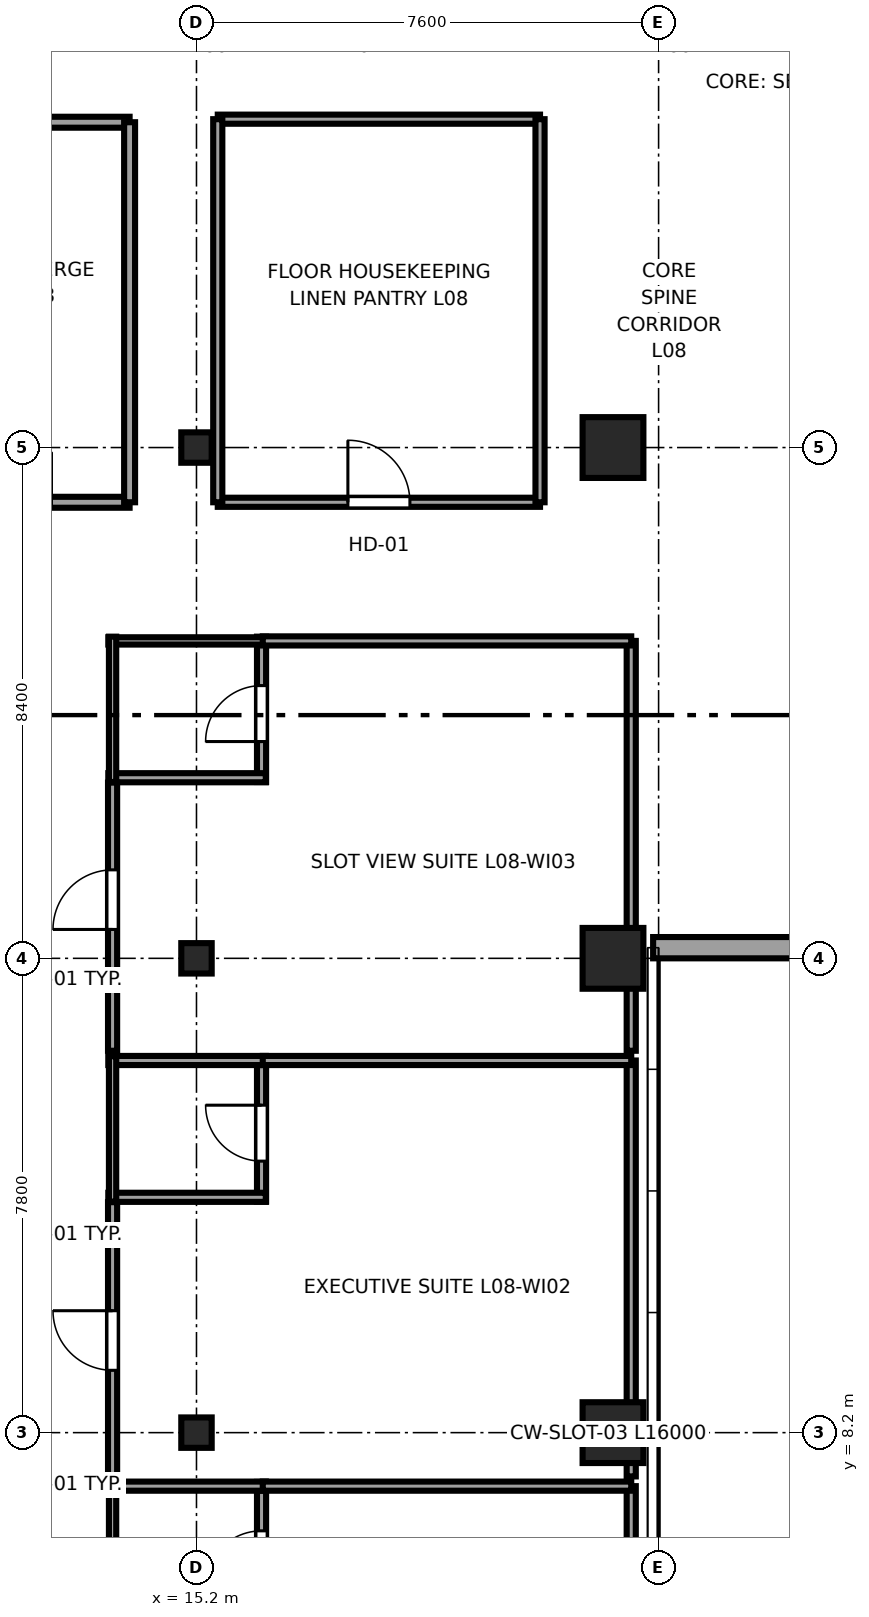
"""IFC4 building model, lengths in metres.
Left out: names, types, materials, properties, quantities, classifications, styles, units other than length and angle.
Written with IfcOpenShell. Run it as: python <this file> out.ifc"""

import sys

from ifc_helpers import new_model, si_unit, direction, frame, frame_2d, origin, origin_2d, place, context, subcontext, project, spatial, rectangle, i_section, extrude, source, transform, mapped, element, fill, save


model = new_model("IFC4")
c1 = context("Model", 3, precision=1e-05, world=origin(), true_north=direction((0.0, 1.0)))
c2 = subcontext(c1, "Body", "Model", "MODEL_VIEW")
j1 = project(units=[si_unit("LENGTHUNIT", "METRE"), si_unit("PLANEANGLEUNIT", "RADIAN")], contexts=[c1])
p1 = place(None, origin())
s1 = spatial("IfcSite", under=j1, at=p1, CompositionType="ELEMENT")
p2 = place(p1, origin())
s2 = spatial("IfcBuilding", under=s1, at=p2, CompositionType="ELEMENT")
p3 = place(p2, frame((0.0, 0.0, 39.1)))
s3 = spatial("IfcBuildingStorey", under=s2, at=p3, CompositionType="ELEMENT", Elevation=39.1)
m1 = source(origin(), c2, "Body", "SweptSolid", [
    extrude(i_section(OverallWidth=0.5, OverallDepth=0.5, WebThickness=0.028, FlangeThickness=0.045, at=origin_2d()), origin(), (0.0, 0.0, 1.0), 3.55),
])
for number, where, z_axis, x_axis in (
    (1, (15.2, 8.2, 0.0), (0.0, 0.0, 1.0), (1.0, 0.0, 0.0)),
    (2, (15.2, 16.0, 0.0), (0.0, 0.0, 1.0), (1.0, 0.0, 0.0)),
    (3, (15.2, 24.4, 0.0), (0.0, 0.0, 1.0), (1.0, 0.0, 0.0)),
):
    element("IfcColumn", number, at=place(p3, frame(where, z_axis=z_axis, x_axis=x_axis)), inside=s3, PredefinedType="COLUMN", context=c2, shape_type="MappedRepresentation", body=[
        mapped(m1, transform((0.0, 0.0, 0.0), x_axis=(1.0, 0.0, 0.0), y_axis=(0.0, 1.0, 0.0), z_axis=(0.0, 0.0, 1.0), scale=1.0)),
    ])
m2 = source(origin(), c2, "Body", "SweptSolid", [
    extrude(rectangle(XDim=1.0, YDim=1.0, at=origin_2d()), origin(), (0.0, 0.0, 1.0), 3.55),
])
for number, where, z_axis, x_axis in (
    (4, (22.05, 8.2, 0.0), (0.0, 0.0, 1.0), (1.0, 0.0, 0.0)),
    (5, (22.05, 16.0, 0.0), (0.0, 0.0, 1.0), (1.0, 0.0, 0.0)),
    (6, (22.05, 24.4, 0.0), (0.0, 0.0, 1.0), (1.0, 0.0, 0.0)),
):
    element("IfcColumn", number, at=place(p3, frame(where, z_axis=z_axis, x_axis=x_axis)), inside=s3, PredefinedType="COLUMN", context=c2, shape_type="MappedRepresentation", body=[
        mapped(m2, transform((0.0, 0.0, 0.0), x_axis=(1.0, 0.0, 0.0), y_axis=(0.0, 1.0, 0.0), z_axis=(0.0, 0.0, 1.0), scale=1.0)),
    ])
p4 = place(p3, frame((22.71, 16.175, 0.0), z_axis=(0.0, 0.0, 1.0), x_axis=(1.0, 0.0, 0.0)))
e7 = element("IfcWall", 7, at=p4, inside=s3, PredefinedType="SOLIDWALL", context=c2, shape_type="SweptSolid", body=[
    extrude(rectangle(XDim=11.58, YDim=0.35, at=frame_2d((5.79, 0.0))), origin(), (0.0, 0.0, 1.0), 2.748),
])
p5 = place(p4, frame((2.295, 0.0, 0.68)))
e8 = element("IfcOpeningElement", 8, at=p5, cuts=e7, PredefinedType="OPENING", context=c2, shape_type="SweptSolid", body=[
    extrude(rectangle(XDim=1.8, YDim=1.85, at=frame_2d((0.9, 0.925))), frame((0.0, 0.185, 0.0), z_axis=(0.0, -1.0, 0.0), x_axis=(1.0, 0.0, 0.0)), (0.0, 0.0, 1.0), 0.37),
])
p6 = place(p4, frame((7.485, 0.0, 0.68)))
e9 = element("IfcOpeningElement", 9, at=p6, cuts=e7, PredefinedType="OPENING", context=c2, shape_type="SweptSolid", body=[
    extrude(rectangle(XDim=1.8, YDim=1.85, at=frame_2d((0.9, 0.925))), frame((0.0, 0.185, 0.0), z_axis=(0.0, -1.0, 0.0), x_axis=(1.0, 0.0, 0.0)), (0.0, 0.0, 1.0), 0.37),
])
p7 = place(p3, frame((16.27, 5.0, 0.0), z_axis=(0.0, 0.0, 1.0), x_axis=(0.0, 1.0, 0.0)))
e10 = element("IfcWall", 10, at=p7, inside=s3, PredefinedType="PARTITIONING", context=c2, shape_type="SweptSolid", body=[
    extrude(rectangle(XDim=2.39, YDim=0.15, at=frame_2d((1.195, 0.0))), origin(), (0.0, 0.0, 1.0), 3.37),
])
p8 = place(p7, frame((0.665, 0.0, 0.0)))
e11 = element("IfcOpeningElement", 11, at=p8, cuts=e10, PredefinedType="OPENING", context=c2, shape_type="SweptSolid", body=[
    extrude(rectangle(XDim=0.92, YDim=2.01, at=frame_2d((0.46, 1.005))), frame((0.0, 0.085, 0.0), z_axis=(0.0, -1.0, 0.0), x_axis=(1.0, 0.0, 0.0)), (0.0, 0.0, 1.0), 0.17),
])
p9 = place(p3, frame((13.75, 7.32, 0.0), z_axis=(0.0, 0.0, 1.0), x_axis=(1.0, 0.0, 0.0)))
e12 = element("IfcWall", 12, at=p9, inside=s3, PredefinedType="PARTITIONING", context=c2, shape_type="SweptSolid", body=[
    extrude(rectangle(XDim=2.59, YDim=0.15, at=frame_2d((1.295, 0.0))), origin(), (0.0, 0.0, 1.0), 3.37),
])
p10 = place(p3, frame((13.82, 5.0, 0.0), z_axis=(0.0, 0.0, 1.0), x_axis=(0.0, 1.0, 0.0)))
e13 = element("IfcWall", 13, at=p10, inside=s3, PredefinedType="PLUMBINGWALL", context=c2, shape_type="SweptSolid", body=[
    extrude(rectangle(XDim=2.39, YDim=0.12, at=frame_2d((1.195, 0.0))), origin(), (0.0, 0.0, 1.0), 3.37),
])
p11 = place(p3, frame((16.27, 12.0, 0.0), z_axis=(0.0, 0.0, 1.0), x_axis=(0.0, 1.0, 0.0)))
e14 = element("IfcWall", 14, at=p11, inside=s3, PredefinedType="PARTITIONING", context=c2, shape_type="SweptSolid", body=[
    extrude(rectangle(XDim=2.39, YDim=0.15, at=frame_2d((1.195, 0.0))), origin(), (0.0, 0.0, 1.0), 3.37),
])
p12 = place(p11, frame((0.665, 0.0, 0.0)))
e15 = element("IfcOpeningElement", 15, at=p12, cuts=e14, PredefinedType="OPENING", context=c2, shape_type="SweptSolid", body=[
    extrude(rectangle(XDim=0.92, YDim=2.01, at=frame_2d((0.46, 1.005))), frame((0.0, 0.085, 0.0), z_axis=(0.0, -1.0, 0.0), x_axis=(1.0, 0.0, 0.0)), (0.0, 0.0, 1.0), 0.17),
])
for number, where, z_axis, x_axis in (
    (16, (13.75, 12.07, 0.0), (0.0, 0.0, 1.0), (1.0, 0.0, 0.0)),
    (17, (13.75, 14.32, 0.0), (0.0, 0.0, 1.0), (1.0, 0.0, 0.0)),
):
    element("IfcWall", number, at=place(p3, frame(where, z_axis=z_axis, x_axis=x_axis)), inside=s3, PredefinedType="PARTITIONING", context=c2, shape_type="SweptSolid", body=[
        extrude(rectangle(XDim=2.59, YDim=0.15, at=frame_2d((1.295, 0.0))), origin(), (0.0, 0.0, 1.0), 3.37),
    ])
p13 = place(p3, frame((13.82, 12.0, 0.0), z_axis=(0.0, 0.0, 1.0), x_axis=(0.0, 1.0, 0.0)))
e18 = element("IfcWall", 18, at=p13, inside=s3, PredefinedType="PLUMBINGWALL", context=c2, shape_type="SweptSolid", body=[
    extrude(rectangle(XDim=2.39, YDim=0.12, at=frame_2d((1.195, 0.0))), origin(), (0.0, 0.0, 1.0), 3.37),
])
p14 = place(p3, frame((16.27, 18.9, 0.0), z_axis=(0.0, 0.0, 1.0), x_axis=(0.0, 1.0, 0.0)))
e19 = element("IfcWall", 19, at=p14, inside=s3, PredefinedType="PARTITIONING", context=c2, shape_type="SweptSolid", body=[
    extrude(rectangle(XDim=2.39, YDim=0.15, at=frame_2d((1.195, 0.0))), origin(), (0.0, 0.0, 1.0), 3.37),
])
p15 = place(p14, frame((0.665, 0.0, 0.0)))
e20 = element("IfcOpeningElement", 20, at=p15, cuts=e19, PredefinedType="OPENING", context=c2, shape_type="SweptSolid", body=[
    extrude(rectangle(XDim=0.92, YDim=2.01, at=frame_2d((0.46, 1.005))), frame((0.0, 0.085, 0.0), z_axis=(0.0, -1.0, 0.0), x_axis=(1.0, 0.0, 0.0)), (0.0, 0.0, 1.0), 0.17),
])
p16 = place(p3, frame((13.75, 18.97, 0.0), z_axis=(0.0, 0.0, 1.0), x_axis=(1.0, 0.0, 0.0)))
e21 = element("IfcWall", 21, at=p16, inside=s3, PredefinedType="PARTITIONING", context=c2, shape_type="SweptSolid", body=[
    extrude(rectangle(XDim=2.59, YDim=0.15, at=frame_2d((1.295, 0.0))), origin(), (0.0, 0.0, 1.0), 3.37),
])
p17 = place(p3, frame((13.75, 21.22, 0.0), z_axis=(0.0, 0.0, 1.0), x_axis=(1.0, 0.0, 0.0)))
e22 = element("IfcWall", 22, at=p17, inside=s3, PredefinedType="PLUMBINGWALL", context=c2, shape_type="SweptSolid", body=[
    extrude(rectangle(XDim=2.59, YDim=0.12, at=frame_2d((1.295, 0.0))), origin(), (0.0, 0.0, 1.0), 3.37),
])
p18 = place(p3, frame((13.82, 18.9, 0.0), z_axis=(0.0, 0.0, 1.0), x_axis=(0.0, 1.0, 0.0)))
e23 = element("IfcWall", 23, at=p18, inside=s3, PredefinedType="PLUMBINGWALL", context=c2, shape_type="SweptSolid", body=[
    extrude(rectangle(XDim=2.39, YDim=0.12, at=frame_2d((1.195, 0.0))), origin(), (0.0, 0.0, 1.0), 3.37),
])
p19 = place(p3, frame((22.35, 0.405, 0.0), z_axis=(0.0, 0.0, 1.0), x_axis=(0.0, 1.0, 0.0)))
e24 = element("IfcWall", 24, at=p19, inside=s3, PredefinedType="PARTITIONING", context=c2, shape_type="SweptSolid", body=[
    extrude(rectangle(XDim=6.915, YDim=0.15, at=frame_2d((3.458, 0.0))), origin(), (0.0, 0.0, 1.0), 3.37),
])
p20 = place(p3, frame((16.29, 7.32, 0.0), z_axis=(0.0, 0.0, 1.0), x_axis=(1.0, 0.0, 0.0)))
e25 = element("IfcWall", 25, at=p20, inside=s3, PredefinedType="PARTITIONING", context=c2, shape_type="SweptSolid", body=[
    extrude(rectangle(XDim=6.06, YDim=0.15, at=frame_2d((3.03, 0.0))), origin(), (0.0, 0.0, 1.0), 3.37),
])
p21 = place(p3, frame((13.82, 7.48, 0.0), z_axis=(0.0, 0.0, 1.0), x_axis=(0.0, 1.0, 0.0)))
e26 = element("IfcWall", 26, at=p21, inside=s3, PredefinedType="PARTITIONING", context=c2, shape_type="SweptSolid", body=[
    extrude(rectangle(XDim=4.51, YDim=0.15, at=frame_2d((2.255, 0.0))), origin(), (0.0, 0.0, 1.0), 3.37),
])
p22 = place(p21, frame((1.745, 0.0, 0.0)))
e27 = element("IfcOpeningElement", 27, at=p22, cuts=e26, PredefinedType="OPENING", context=c2, shape_type="SweptSolid", body=[
    extrude(rectangle(XDim=0.98, YDim=2.12, at=frame_2d((0.49, 1.06))), frame((0.0, 0.085, 0.0), z_axis=(0.0, -1.0, 0.0), x_axis=(1.0, 0.0, 0.0)), (0.0, 0.0, 1.0), 0.17),
])
p23 = place(p3, frame((22.35, 7.48, 0.0), z_axis=(0.0, 0.0, 1.0), x_axis=(0.0, 1.0, 0.0)))
e28 = element("IfcWall", 28, at=p23, inside=s3, PredefinedType="PARTITIONING", context=c2, shape_type="SweptSolid", body=[
    extrude(rectangle(XDim=6.84, YDim=0.15, at=frame_2d((3.42, 0.0))), origin(), (0.0, 0.0, 1.0), 3.37),
])
p24 = place(p3, frame((16.29, 14.32, 0.0), z_axis=(0.0, 0.0, 1.0), x_axis=(1.0, 0.0, 0.0)))
e29 = element("IfcWall", 29, at=p24, inside=s3, PredefinedType="PARTITIONING", context=c2, shape_type="SweptSolid", body=[
    extrude(rectangle(XDim=6.06, YDim=0.15, at=frame_2d((3.03, 0.0))), origin(), (0.0, 0.0, 1.0), 3.37),
])
p25 = place(p3, frame((13.82, 14.48, 0.0), z_axis=(0.0, 0.0, 1.0), x_axis=(0.0, 1.0, 0.0)))
e30 = element("IfcWall", 30, at=p25, inside=s3, PredefinedType="PARTITIONING", context=c2, shape_type="SweptSolid", body=[
    extrude(rectangle(XDim=4.41, YDim=0.15, at=frame_2d((2.205, 0.0))), origin(), (0.0, 0.0, 1.0), 3.37),
])
p26 = place(p25, frame((1.995, 0.0, 0.0)))
e31 = element("IfcOpeningElement", 31, at=p26, cuts=e30, PredefinedType="OPENING", context=c2, shape_type="SweptSolid", body=[
    extrude(rectangle(XDim=0.98, YDim=2.12, at=frame_2d((0.49, 1.06))), frame((0.0, 0.085, 0.0), z_axis=(0.0, -1.0, 0.0), x_axis=(1.0, 0.0, 0.0)), (0.0, 0.0, 1.0), 0.17),
])
p27 = place(p3, frame((22.35, 14.48, 0.0), z_axis=(0.0, 0.0, 1.0), x_axis=(0.0, 1.0, 0.0)))
e32 = element("IfcWall", 32, at=p27, inside=s3, PredefinedType="PARTITIONING", context=c2, shape_type="SweptSolid", body=[
    extrude(rectangle(XDim=6.74, YDim=0.15, at=frame_2d((3.37, 0.0))), origin(), (0.0, 0.0, 1.0), 3.37),
])
p28 = place(p3, frame((16.29, 21.22, 0.0), z_axis=(0.0, 0.0, 1.0), x_axis=(1.0, 0.0, 0.0)))
e33 = element("IfcWall", 33, at=p28, inside=s3, PredefinedType="PARTITIONING", context=c2, shape_type="SweptSolid", body=[
    extrude(rectangle(XDim=6.06, YDim=0.15, at=frame_2d((3.03, 0.0))), origin(), (0.0, 0.0, 1.0), 3.37),
])
p29 = place(p3, frame((9.88, 23.5, 0.0), z_axis=(0.0, 0.0, 1.0), x_axis=(1.0, 0.0, 0.0)))
e34 = element("IfcWall", 34, at=p29, inside=s3, PredefinedType="PARTITIONING", context=c2, shape_type="SweptSolid", body=[
    extrude(rectangle(XDim=4.22, YDim=0.18, at=frame_2d((2.11, 0.0))), origin(), (0.0, 0.0, 1.0), 3.37),
])
p30 = place(p29, frame((1.285, 0.0, 0.0)))
e35 = element("IfcOpeningElement", 35, at=p30, cuts=e34, PredefinedType="OPENING", context=c2, shape_type="SweptSolid", body=[
    extrude(rectangle(XDim=1.65, YDim=2.15, at=frame_2d((0.825, 1.075))), frame((0.0, 0.1, 0.0), z_axis=(0.0, -1.0, 0.0), x_axis=(1.0, 0.0, 0.0)), (0.0, 0.0, 1.0), 0.2),
])
p31 = place(p3, frame((9.88, 29.75, 0.0), z_axis=(0.0, 0.0, 1.0), x_axis=(1.0, 0.0, 0.0)))
e36 = element("IfcWall", 36, at=p31, inside=s3, PredefinedType="PARTITIONING", context=c2, shape_type="SweptSolid", body=[
    extrude(rectangle(XDim=4.22, YDim=0.18, at=frame_2d((2.11, 0.0))), origin(), (0.0, 0.0, 1.0), 3.37),
])
p32 = place(p3, frame((14.1, 23.5, 0.0), z_axis=(0.0, 0.0, 1.0), x_axis=(0.0, 1.0, 0.0)))
e37 = element("IfcWall", 37, at=p32, inside=s3, PredefinedType="PARTITIONING", context=c2, shape_type="SweptSolid", body=[
    extrude(rectangle(XDim=6.25, YDim=0.18, at=frame_2d((3.125, 0.0))), origin(), (0.0, 0.0, 1.0), 3.37),
])
p33 = place(p3, frame((15.55, 23.5, 0.0), z_axis=(0.0, 0.0, 1.0), x_axis=(1.0, 0.0, 0.0)))
e38 = element("IfcWall", 38, at=p33, inside=s3, PredefinedType="PARTITIONING", context=c2, shape_type="SweptSolid", body=[
    extrude(rectangle(XDim=5.3, YDim=0.15, at=frame_2d((2.65, 0.0))), origin(), (0.0, 0.0, 1.0), 3.37),
])
p34 = place(p33, frame((2.14, 0.0, 0.0)))
e39 = element("IfcOpeningElement", 39, at=p34, cuts=e38, PredefinedType="OPENING", context=c2, shape_type="SweptSolid", body=[
    extrude(rectangle(XDim=1.02, YDim=2.03, at=frame_2d((0.51, 1.015))), frame((0.0, 0.085, 0.0), z_axis=(0.0, -1.0, 0.0), x_axis=(1.0, 0.0, 0.0)), (0.0, 0.0, 1.0), 0.17),
])
p35 = place(p3, frame((15.55, 29.8, 0.0), z_axis=(0.0, 0.0, 1.0), x_axis=(1.0, 0.0, 0.0)))
e40 = element("IfcWall", 40, at=p35, inside=s3, PredefinedType="PARTITIONING", context=c2, shape_type="SweptSolid", body=[
    extrude(rectangle(XDim=5.3, YDim=0.15, at=frame_2d((2.65, 0.0))), origin(), (0.0, 0.0, 1.0), 3.37),
])
for number, where, z_axis, x_axis in (
    (41, (15.55, 23.5, 0.0), (0.0, 0.0, 1.0), (0.0, 1.0, 0.0)),
    (42, (20.85, 23.5, 0.0), (0.0, 0.0, 1.0), (0.0, 1.0, 0.0)),
):
    element("IfcWall", number, at=place(p3, frame(where, z_axis=z_axis, x_axis=x_axis)), inside=s3, PredefinedType="PARTITIONING", context=c2, shape_type="SweptSolid", body=[
        extrude(rectangle(XDim=6.3, YDim=0.15, at=frame_2d((3.15, 0.0))), origin(), (0.0, 0.0, 1.0), 3.37),
    ])
m3 = source(origin(), c2, "Body", "SweptSolid", [
    extrude(rectangle(XDim=0.92, YDim=2.01, at=frame_2d((0.46, 1.005))), frame((0.0, 0.025, 0.0), z_axis=(0.0, -1.0, 0.0), x_axis=(1.0, 0.0, 0.0)), (0.0, 0.0, 1.0), 0.05),
])
p36 = place(p8, origin())
e43 = element("IfcDoor", 43, at=p36, inside=s3, OperationType="SINGLE_SWING_LEFT", PredefinedType="DOOR", context=c2, shape_type="MappedRepresentation", body=[
    mapped(m3, transform((0.0, 0.0, 0.0), x_axis=(1.0, 0.0, 0.0), y_axis=(0.0, 1.0, 0.0), z_axis=(0.0, 0.0, 1.0), scale=1.0)),
])
fill(e11, e43)
p37 = place(p12, origin())
e44 = element("IfcDoor", 44, at=p37, inside=s3, OperationType="SINGLE_SWING_RIGHT", PredefinedType="DOOR", context=c2, shape_type="MappedRepresentation", body=[
    mapped(m3, transform((0.0, 0.0, 0.0), x_axis=(1.0, 0.0, 0.0), y_axis=(0.0, 1.0, 0.0), z_axis=(0.0, 0.0, 1.0), scale=1.0)),
])
fill(e15, e44)
p38 = place(p15, origin())
e45 = element("IfcDoor", 45, at=p38, inside=s3, OperationType="SINGLE_SWING_LEFT", PredefinedType="DOOR", context=c2, shape_type="MappedRepresentation", body=[
    mapped(m3, transform((0.0, 0.0, 0.0), x_axis=(1.0, 0.0, 0.0), y_axis=(0.0, 1.0, 0.0), z_axis=(0.0, 0.0, 1.0), scale=1.0)),
])
fill(e20, e45)
m4 = source(origin(), c2, "Body", "SweptSolid", [
    extrude(rectangle(XDim=0.98, YDim=2.12, at=frame_2d((0.49, 1.06))), frame((0.0, 0.025, 0.0), z_axis=(0.0, -1.0, 0.0), x_axis=(1.0, 0.0, 0.0)), (0.0, 0.0, 1.0), 0.05),
])
p39 = place(p22, origin())
e46 = element("IfcDoor", 46, at=p39, inside=s3, OperationType="SINGLE_SWING_RIGHT", PredefinedType="DOOR", context=c2, shape_type="MappedRepresentation", body=[
    mapped(m4, transform((0.0, 0.0, 0.0), x_axis=(1.0, 0.0, 0.0), y_axis=(0.0, 1.0, 0.0), z_axis=(0.0, 0.0, 1.0), scale=1.0)),
])
fill(e27, e46)
p40 = place(p26, origin())
e47 = element("IfcDoor", 47, at=p40, inside=s3, OperationType="SINGLE_SWING_LEFT", PredefinedType="DOOR", context=c2, shape_type="MappedRepresentation", body=[
    mapped(m4, transform((0.0, 0.0, 0.0), x_axis=(1.0, 0.0, 0.0), y_axis=(0.0, 1.0, 0.0), z_axis=(0.0, 0.0, 1.0), scale=1.0)),
])
fill(e31, e47)
m5 = source(origin(), c2, "Body", "SweptSolid", [
    extrude(rectangle(XDim=1.02, YDim=2.03, at=frame_2d((0.51, 1.015))), frame((0.0, 0.025, 0.0), z_axis=(0.0, -1.0, 0.0), x_axis=(1.0, 0.0, 0.0)), (0.0, 0.0, 1.0), 0.05),
])
p41 = place(p34, origin())
e48 = element("IfcDoor", 48, at=p41, inside=s3, OperationType="SINGLE_SWING_LEFT", PredefinedType="DOOR", context=c2, shape_type="MappedRepresentation", body=[
    mapped(m5, transform((0.0, 0.0, 0.0), x_axis=(1.0, 0.0, 0.0), y_axis=(0.0, 1.0, 0.0), z_axis=(0.0, 0.0, 1.0), scale=1.0)),
])
fill(e39, e48)
save(model, sys.argv[1])
